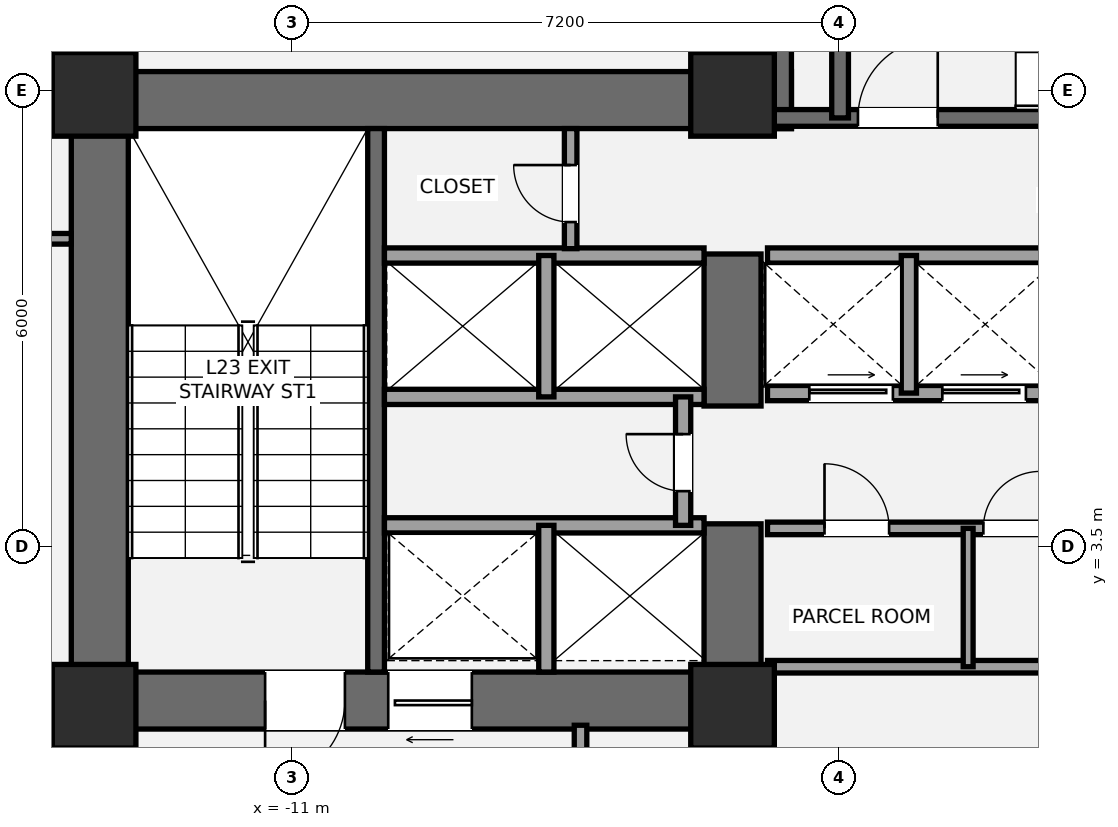
"""IFC4 building model, lengths in metres.
Left out: names, types, materials, properties, quantities, classifications, styles, units other than length and angle.
Written with IfcOpenShell. Run it as: python <this file> out.ifc"""

import sys

from ifc_helpers import new_model, si_unit, direction, frame, frame_2d, origin, origin_2d, place, context, subcontext, project, spatial, rectangle, extrude, element, fill, save


model = new_model("IFC4")
c1 = context("Model", 3, precision=1e-05, world=origin(), true_north=direction((0.0, 1.0)))
c2 = subcontext(c1, "Body", "Model", "MODEL_VIEW")
j1 = project(units=[si_unit("LENGTHUNIT", "METRE"), si_unit("PLANEANGLEUNIT", "RADIAN")], contexts=[c1])
p1 = place(None, origin())
s1 = spatial("IfcSite", under=j1, at=p1, CompositionType="ELEMENT")
p2 = place(p1, origin())
s2 = spatial("IfcBuilding", under=s1, at=p2, CompositionType="ELEMENT")
p3 = place(p2, frame((0.0, 0.0, 89.6)))
s3 = spatial("IfcBuildingStorey", under=s2, at=p3, CompositionType="ELEMENT", Elevation=89.6)
p4 = place(p3, frame((-13.525, 1.1, 0.0), z_axis=(0.0, 0.0, 1.0), x_axis=(0.0, 1.0, 0.0)))
e1 = element("IfcWall", 1, at=p4, inside=s3, PredefinedType="SHEAR", context=c2, shape_type="SweptSolid", body=[
    extrude(rectangle(XDim=8.65, YDim=0.75, at=frame_2d((4.325, 0.0))), origin(), (0.0, 0.0, 1.0), 3.5),
])
p5 = place(p3, frame((-13.9, 9.375, 0.0), z_axis=(0.0, 0.0, 1.0), x_axis=(1.0, 0.0, 0.0)))
e2 = element("IfcWall", 2, at=p5, inside=s3, PredefinedType="SHEAR", context=c2, shape_type="SweptSolid", body=[
    extrude(rectangle(XDim=9.475, YDim=0.75, at=frame_2d((4.737, 0.0))), origin(), (0.0, 0.0, 1.0), 3.5),
])
p6 = place(p3, frame((-4.825, 1.475, 0.0), z_axis=(0.0, 0.0, 1.0), x_axis=(-1.0, 0.0, 0.0)))
e3 = element("IfcWall", 3, at=p6, inside=s3, PredefinedType="SHEAR", context=c2, shape_type="SweptSolid", body=[
    extrude(rectangle(XDim=9.075, YDim=0.75, at=frame_2d((4.538, 0.0))), origin(), (0.0, 0.0, 1.0), 3.5),
])
p7 = place(p6, frame((5.475, 0.0, 0.0)))
e4 = element("IfcOpeningElement", 4, at=p7, cuts=e3, PredefinedType="OPENING", context=c2, shape_type="SweptSolid", body=[
    extrude(rectangle(XDim=1.05, YDim=2.15, at=frame_2d((0.525, 1.075))), frame((0.0, 0.385, 0.0), z_axis=(0.0, -1.0, 0.0), x_axis=(1.0, 0.0, 0.0)), (0.0, 0.0, 1.0), 0.77),
])
p8 = place(p6, frame((3.805, 0.0, 0.0)))
e5 = element("IfcOpeningElement", 5, at=p8, cuts=e3, PredefinedType="OPENING", context=c2, shape_type="SweptSolid", body=[
    extrude(rectangle(XDim=1.1, YDim=2.2, at=frame_2d((0.55, 1.1))), frame((0.0, 0.385, 0.0), z_axis=(0.0, -1.0, 0.0), x_axis=(1.0, 0.0, 0.0)), (0.0, 0.0, 1.0), 0.77),
])
p9 = place(p3, frame((-5.2, 1.1, 0.0), z_axis=(0.0, 0.0, 1.0), x_axis=(0.0, 1.0, 0.0)))
e6 = element("IfcWall", 6, at=p9, inside=s3, PredefinedType="SHEAR", context=c2, shape_type="SweptSolid", body=[
    extrude(rectangle(XDim=2.7, YDim=0.75, at=frame_2d((1.35, 0.0))), origin(), (0.0, 0.0, 1.0), 3.5),
])
p10 = place(p3, frame((-5.2, 5.35, 0.0), z_axis=(0.0, 0.0, 1.0), x_axis=(0.0, 1.0, 0.0)))
e7 = element("IfcWall", 7, at=p10, inside=s3, PredefinedType="SHEAR", context=c2, shape_type="SweptSolid", body=[
    extrude(rectangle(XDim=2.0, YDim=0.75, at=frame_2d((1.0, 0.0))), origin(), (0.0, 0.0, 1.0), 3.5),
])
p11 = place(p3, frame((-9.89, 1.85, 0.0), z_axis=(0.0, 0.0, 1.0), x_axis=(0.0, 1.0, 0.0)))
e8 = element("IfcWall", 8, at=p11, inside=s3, PredefinedType="SHEAR", context=c2, shape_type="SweptSolid", body=[
    extrude(rectangle(XDim=7.15, YDim=0.22, at=frame_2d((3.575, 0.0))), origin(), (0.0, 0.0, 1.0), 3.5),
])
p12 = place(p3, frame((-4.8, 9.0, 0.0), z_axis=(0.0, 0.0, 1.0), x_axis=(0.0, 1.0, 0.0)))
e9 = element("IfcWall", 9, at=p12, inside=s3, PredefinedType="SHEAR", context=c2, shape_type="SweptSolid", body=[
    extrude(rectangle(XDim=4.15, YDim=0.75, at=frame_2d((2.075, 0.0))), origin(), (0.0, 0.0, 1.0), 3.5),
])
p13 = place(p3, frame((-4.7, 9.14, 0.0), z_axis=(0.0, 0.0, 1.0), x_axis=(1.0, 0.0, 0.0)))
e10 = element("IfcWall", 10, at=p13, inside=s3, PredefinedType="SHEAR", context=c2, shape_type="SweptSolid", body=[
    extrude(rectangle(XDim=9.3, YDim=0.22, at=frame_2d((4.65, 0.0))), origin(), (0.0, 0.0, 1.0), 3.5),
])
p14 = place(p13, frame((1.15, 0.0, 0.0)))
e11 = element("IfcOpeningElement", 11, at=p14, cuts=e10, PredefinedType="OPENING", context=c2, shape_type="SweptSolid", body=[
    extrude(rectangle(XDim=1.05, YDim=2.15, at=frame_2d((0.525, 1.075))), frame((0.0, 0.12, 0.0), z_axis=(0.0, -1.0, 0.0), x_axis=(1.0, 0.0, 0.0)), (0.0, 0.0, 1.0), 0.24),
])
p15 = place(p3, frame((-3.785, 9.14, 0.0), z_axis=(0.0, 0.0, 1.0), x_axis=(0.0, 1.0, 0.0)))
e12 = element("IfcWall", 12, at=p15, inside=s3, PredefinedType="SHEAR", context=c2, shape_type="SweptSolid", body=[
    extrude(rectangle(XDim=3.26, YDim=0.22, at=frame_2d((1.63, 0.0))), origin(), (0.0, 0.0, 1.0), 3.5),
])
for number, where, z_axis, x_axis in (
    (13, (-13.6, 1.4, 0.0), (0.0, 0.0, 1.0), (1.0, 0.0, 0.0)),
    (14, (-13.6, 9.45, 0.0), (0.0, 0.0, 1.0), (1.0, 0.0, 0.0)),
    (15, (-5.2, 1.4, 0.0), (0.0, 0.0, 1.0), (1.0, 0.0, 0.0)),
    (16, (-5.2, 9.45, 0.0), (0.0, 0.0, 1.0), (1.0, 0.0, 0.0)),
):
    element("IfcColumn", number, at=place(p3, frame(where, z_axis=z_axis, x_axis=x_axis)), inside=s3, PredefinedType="COLUMN", context=c2, shape_type="SweptSolid", body=[
        extrude(rectangle(XDim=1.1, YDim=1.1, at=origin_2d()), origin(), (0.0, 0.0, 1.0), 3.5),
    ])
p16 = place(p3, frame((-13.45, -2.15, 0.0), z_axis=(0.0, 0.0, 1.0), x_axis=(0.0, 1.0, 0.0)))
e17 = element("IfcWall", 17, at=p16, inside=s3, PredefinedType="PARTITIONING", context=c2, shape_type="SweptSolid", body=[
    extrude(rectangle(XDim=3.3, YDim=0.165, at=frame_2d((1.65, 0.0))), origin(), (0.0, 0.0, 1.0), 2.763),
])
p17 = place(p16, frame((1.15, 0.0, 0.0)))
e18 = element("IfcOpeningElement", 18, at=p17, cuts=e17, PredefinedType="OPENING", context=c2, shape_type="SweptSolid", body=[
    extrude(rectangle(XDim=1.05, YDim=2.15, at=frame_2d((0.525, 1.075))), frame((0.0, 0.093, 0.0), z_axis=(0.0, -1.0, 0.0), x_axis=(1.0, 0.0, 0.0)), (0.0, 0.0, 1.0), 0.185),
])
p18 = place(p3, frame((-7.2, -2.15, 0.0), z_axis=(0.0, 0.0, 1.0), x_axis=(0.0, 1.0, 0.0)))
e19 = element("IfcWall", 19, at=p18, inside=s3, PredefinedType="PARTITIONING", context=c2, shape_type="SweptSolid", body=[
    extrude(rectangle(XDim=3.3, YDim=0.165, at=frame_2d((1.65, 0.0))), origin(), (0.0, 0.0, 1.0), 2.763),
])
p19 = place(p3, frame((-4.95, -2.15, 0.0), z_axis=(0.0, 0.0, 1.0), x_axis=(0.0, 1.0, 0.0)))
e20 = element("IfcWall", 20, at=p19, inside=s3, PredefinedType="SOLIDWALL", context=c2, shape_type="SweptSolid", body=[
    extrude(rectangle(XDim=3.3, YDim=0.2, at=frame_2d((1.65, 0.0))), origin(), (0.0, 0.0, 1.0), 2.763),
])
p20 = place(p19, frame((0.95, 0.0, 0.0)))
e21 = element("IfcOpeningElement", 21, at=p20, cuts=e20, PredefinedType="OPENING", context=c2, shape_type="SweptSolid", body=[
    extrude(rectangle(XDim=0.75, YDim=2.1, at=frame_2d((0.375, 1.05))), frame((0.0, 0.11, 0.0), z_axis=(0.0, -1.0, 0.0), x_axis=(1.0, 0.0, 0.0)), (0.0, 0.0, 1.0), 0.22),
])
p21 = place(p3, frame((-9.78, 3.78, 0.0), z_axis=(0.0, 0.0, 1.0), x_axis=(1.0, 0.0, 0.0)))
e22 = element("IfcWall", 22, at=p21, inside=s3, PredefinedType="SOLIDWALL", context=c2, shape_type="SweptSolid", body=[
    extrude(rectangle(XDim=4.205, YDim=0.2, at=frame_2d((2.103, 0.0))), origin(), (0.0, 0.0, 1.0), 3.31),
])
p22 = place(p3, frame((-7.65, 1.85, 0.0), z_axis=(0.0, 0.0, 1.0), x_axis=(0.0, 1.0, 0.0)))
e23 = element("IfcWall", 23, at=p22, inside=s3, PredefinedType="SOLIDWALL", context=c2, shape_type="SweptSolid", body=[
    extrude(rectangle(XDim=1.93, YDim=0.2, at=frame_2d((0.965, 0.0))), origin(), (0.0, 0.0, 1.0), 3.31),
])
for number, where, z_axis, x_axis in (
    (24, (-9.78, 5.47, 0.0), (0.0, 0.0, 1.0), (1.0, 0.0, 0.0)),
    (25, (-9.78, 7.33, 0.0), (0.0, 0.0, 1.0), (1.0, 0.0, 0.0)),
):
    element("IfcWall", number, at=place(p3, frame(where, z_axis=z_axis, x_axis=x_axis)), inside=s3, PredefinedType="SOLIDWALL", context=c2, shape_type="SweptSolid", body=[
        extrude(rectangle(XDim=4.205, YDim=0.2, at=frame_2d((2.103, 0.0))), origin(), (0.0, 0.0, 1.0), 3.31),
    ])
p23 = place(p3, frame((-7.65, 5.47, 0.0), z_axis=(0.0, 0.0, 1.0), x_axis=(0.0, 1.0, 0.0)))
e26 = element("IfcWall", 26, at=p23, inside=s3, PredefinedType="SOLIDWALL", context=c2, shape_type="SweptSolid", body=[
    extrude(rectangle(XDim=1.86, YDim=0.2, at=frame_2d((0.93, 0.0))), origin(), (0.0, 0.0, 1.0), 3.31),
])
p24 = place(p3, frame((-5.85, 3.78, 0.0), z_axis=(0.0, 0.0, 1.0), x_axis=(0.0, 1.0, 0.0)))
e27 = element("IfcWall", 27, at=p24, inside=s3, PredefinedType="SOLIDWALL", context=c2, shape_type="SweptSolid", body=[
    extrude(rectangle(XDim=1.69, YDim=0.2, at=frame_2d((0.845, 0.0))), origin(), (0.0, 0.0, 1.0), 3.31),
])
p25 = place(p24, frame((0.45, 0.0, 0.0)))
e28 = element("IfcOpeningElement", 28, at=p25, cuts=e27, PredefinedType="OPENING", context=c2, shape_type="SweptSolid", body=[
    extrude(rectangle(XDim=0.75, YDim=2.1, at=frame_2d((0.375, 1.05))), frame((0.0, 0.11, 0.0), z_axis=(0.0, -1.0, 0.0), x_axis=(1.0, 0.0, 0.0)), (0.0, 0.0, 1.0), 0.22),
])
p26 = place(p3, frame((-4.74, 1.92, 0.0), z_axis=(0.0, 0.0, 1.0), x_axis=(1.0, 0.0, 0.0)))
e29 = element("IfcWall", 29, at=p26, inside=s3, PredefinedType="PARTITIONING", context=c2, shape_type="SweptSolid", body=[
    extrude(rectangle(XDim=3.89, YDim=0.165, at=frame_2d((1.945, 0.0))), origin(), (0.0, 0.0, 1.0), 2.3),
])
p27 = place(p3, frame((-4.74, 3.74, 0.0), z_axis=(0.0, 0.0, 1.0), x_axis=(1.0, 0.0, 0.0)))
e30 = element("IfcWall", 30, at=p27, inside=s3, PredefinedType="PARTITIONING", context=c2, shape_type="SweptSolid", body=[
    extrude(rectangle(XDim=3.89, YDim=0.165, at=frame_2d((1.945, 0.0))), origin(), (0.0, 0.0, 1.0), 3.31),
])
p28 = place(p27, frame((0.75, 0.0, 0.0)))
e31 = element("IfcOpeningElement", 31, at=p28, cuts=e30, PredefinedType="OPENING", context=c2, shape_type="SweptSolid", body=[
    extrude(rectangle(XDim=0.85, YDim=2.1, at=frame_2d((0.425, 1.05))), frame((0.0, 0.093, 0.0), z_axis=(0.0, -1.0, 0.0), x_axis=(1.0, 0.0, 0.0)), (0.0, 0.0, 1.0), 0.185),
])
p29 = place(p27, frame((2.84, 0.0, 0.0)))
e32 = element("IfcOpeningElement", 32, at=p29, cuts=e30, PredefinedType="OPENING", context=c2, shape_type="SweptSolid", body=[
    extrude(rectangle(XDim=0.75, YDim=2.1, at=frame_2d((0.375, 1.05))), frame((0.0, 0.093, 0.0), z_axis=(0.0, -1.0, 0.0), x_axis=(1.0, 0.0, 0.0)), (0.0, 0.0, 1.0), 0.185),
])
p30 = place(p3, frame((-2.1, 1.92, 0.0), z_axis=(0.0, 0.0, 1.0), x_axis=(0.0, 1.0, 0.0)))
e33 = element("IfcWall", 33, at=p30, inside=s3, PredefinedType="PARTITIONING", context=c2, shape_type="SweptSolid", body=[
    extrude(rectangle(XDim=1.82, YDim=0.13, at=frame_2d((0.91, 0.0))), origin(), (0.0, 0.0, 1.0), 3.31),
])
p31 = place(p3, frame((-4.74, 5.52, 0.0), z_axis=(0.0, 0.0, 1.0), x_axis=(1.0, 0.0, 0.0)))
e34 = element("IfcWall", 34, at=p31, inside=s3, PredefinedType="SOLIDWALL", context=c2, shape_type="SweptSolid", body=[
    extrude(rectangle(XDim=3.86, YDim=0.2, at=frame_2d((1.93, 0.0))), origin(), (0.0, 0.0, 1.0), 3.31),
])
p32 = place(p31, frame((0.55, 0.0, 0.0)))
e35 = element("IfcOpeningElement", 35, at=p32, cuts=e34, PredefinedType="OPENING", context=c2, shape_type="SweptSolid", body=[
    extrude(rectangle(XDim=1.1, YDim=2.2, at=frame_2d((0.55, 1.1))), frame((0.0, 0.11, 0.0), z_axis=(0.0, -1.0, 0.0), x_axis=(1.0, 0.0, 0.0)), (0.0, 0.0, 1.0), 0.22),
])
p33 = place(p31, frame((2.3, 0.0, 0.0)))
e36 = element("IfcOpeningElement", 36, at=p33, cuts=e34, PredefinedType="OPENING", context=c2, shape_type="SweptSolid", body=[
    extrude(rectangle(XDim=1.1, YDim=2.2, at=frame_2d((0.55, 1.1))), frame((0.0, 0.11, 0.0), z_axis=(0.0, -1.0, 0.0), x_axis=(1.0, 0.0, 0.0)), (0.0, 0.0, 1.0), 0.22),
])
p34 = place(p3, frame((-4.74, 7.33, 0.0), z_axis=(0.0, 0.0, 1.0), x_axis=(1.0, 0.0, 0.0)))
e37 = element("IfcWall", 37, at=p34, inside=s3, PredefinedType="SOLIDWALL", context=c2, shape_type="SweptSolid", body=[
    extrude(rectangle(XDim=3.86, YDim=0.2, at=frame_2d((1.93, 0.0))), origin(), (0.0, 0.0, 1.0), 3.31),
])
p35 = place(p3, frame((-2.88, 5.52, 0.0), z_axis=(0.0, 0.0, 1.0), x_axis=(0.0, 1.0, 0.0)))
e38 = element("IfcWall", 38, at=p35, inside=s3, PredefinedType="SOLIDWALL", context=c2, shape_type="SweptSolid", body=[
    extrude(rectangle(XDim=1.81, YDim=0.2, at=frame_2d((0.905, 0.0))), origin(), (0.0, 0.0, 1.0), 3.31),
])
p36 = place(p3, frame((-7.33, 7.42, 0.0), z_axis=(0.0, 0.0, 1.0), x_axis=(0.0, 1.0, 0.0)))
e39 = element("IfcWall", 39, at=p36, inside=s3, PredefinedType="PARTITIONING", context=c2, shape_type="SweptSolid", body=[
    extrude(rectangle(XDim=1.58, YDim=0.165, at=frame_2d((0.79, 0.0))), origin(), (0.0, 0.0, 1.0), 3.31),
])
p37 = place(p36, frame((0.35, 0.0, 0.0)))
e40 = element("IfcOpeningElement", 40, at=p37, cuts=e39, PredefinedType="OPENING", context=c2, shape_type="SweptSolid", body=[
    extrude(rectangle(XDim=0.75, YDim=2.1, at=frame_2d((0.375, 1.05))), frame((0.0, 0.093, 0.0), z_axis=(0.0, -1.0, 0.0), x_axis=(1.0, 0.0, 0.0)), (0.0, 0.0, 1.0), 0.185),
])
p38 = place(p3, frame((-16.2, 7.55, 0.0), z_axis=(0.0, 0.0, 1.0), x_axis=(1.0, 0.0, 0.0)))
e41 = element("IfcWall", 41, at=p38, inside=s3, PredefinedType="PARTITIONING", context=c2, shape_type="SweptSolid", body=[
    extrude(rectangle(XDim=2.3, YDim=0.14, at=frame_2d((1.15, 0.0))), origin(), (0.0, 0.0, 1.0), 2.763),
])
p39 = place(p38, frame((0.32, 0.0, 0.0)))
e42 = element("IfcOpeningElement", 42, at=p39, cuts=e41, PredefinedType="OPENING", context=c2, shape_type="SweptSolid", body=[
    extrude(rectangle(XDim=0.92, YDim=2.15, at=frame_2d((0.46, 1.075))), frame((0.0, 0.08, 0.0), z_axis=(0.0, -1.0, 0.0), x_axis=(1.0, 0.0, 0.0)), (0.0, 0.0, 1.0), 0.16),
])
p40 = place(p7, origin())
e43 = element("IfcDoor", 43, at=p40, inside=s3, OperationType="SINGLE_SWING_RIGHT", PredefinedType="DOOR", context=c2, shape_type="SweptSolid", body=[
    extrude(rectangle(XDim=1.05, YDim=2.15, at=frame_2d((0.525, 1.075))), frame((0.0, 0.025, 0.0), z_axis=(0.0, -1.0, 0.0), x_axis=(1.0, 0.0, 0.0)), (0.0, 0.0, 1.0), 0.05),
])
fill(e4, e43)
p41 = place(p14, origin())
e44 = element("IfcDoor", 44, at=p41, inside=s3, OperationType="SINGLE_SWING_RIGHT", PredefinedType="DOOR", context=c2, shape_type="SweptSolid", body=[
    extrude(rectangle(XDim=1.05, YDim=2.15, at=frame_2d((0.525, 1.075))), frame((0.0, 0.025, 0.0), z_axis=(0.0, -1.0, 0.0), x_axis=(1.0, 0.0, 0.0)), (0.0, 0.0, 1.0), 0.05),
])
fill(e11, e44)
p42 = place(p8, origin())
e45 = element("IfcDoor", 45, at=p42, inside=s3, OperationType="SLIDING_TO_LEFT", PredefinedType="DOOR", context=c2, shape_type="SweptSolid", body=[
    extrude(rectangle(XDim=1.1, YDim=2.2, at=frame_2d((0.55, 1.1))), frame((0.0, 0.025, 0.0), z_axis=(0.0, -1.0, 0.0), x_axis=(1.0, 0.0, 0.0)), (0.0, 0.0, 1.0), 0.05),
])
fill(e5, e45)
p43 = place(p25, origin())
e46 = element("IfcDoor", 46, at=p43, inside=s3, OperationType="SINGLE_SWING_RIGHT", PredefinedType="DOOR", context=c2, shape_type="SweptSolid", body=[
    extrude(rectangle(XDim=0.75, YDim=2.1, at=frame_2d((0.375, 1.05))), frame((0.0, 0.025, 0.0), z_axis=(0.0, -1.0, 0.0), x_axis=(1.0, 0.0, 0.0)), (0.0, 0.0, 1.0), 0.05),
])
fill(e28, e46)
p44 = place(p28, origin())
e47 = element("IfcDoor", 47, at=p44, inside=s3, OperationType="SINGLE_SWING_LEFT", PredefinedType="DOOR", context=c2, shape_type="SweptSolid", body=[
    extrude(rectangle(XDim=0.85, YDim=2.1, at=frame_2d((0.425, 1.05))), frame((0.0, 0.025, 0.0), z_axis=(0.0, -1.0, 0.0), x_axis=(1.0, 0.0, 0.0)), (0.0, 0.0, 1.0), 0.05),
])
fill(e31, e47)
p45 = place(p29, origin())
e48 = element("IfcDoor", 48, at=p45, inside=s3, OperationType="SINGLE_SWING_RIGHT", PredefinedType="DOOR", context=c2, shape_type="SweptSolid", body=[
    extrude(rectangle(XDim=0.75, YDim=2.1, at=frame_2d((0.375, 1.05))), frame((0.0, 0.025, 0.0), z_axis=(0.0, -1.0, 0.0), x_axis=(1.0, 0.0, 0.0)), (0.0, 0.0, 1.0), 0.05),
])
fill(e32, e48)
p46 = place(p32, origin())
e49 = element("IfcDoor", 49, at=p46, inside=s3, OperationType="SLIDING_TO_LEFT", PredefinedType="DOOR", context=c2, shape_type="SweptSolid", body=[
    extrude(rectangle(XDim=1.1, YDim=2.2, at=frame_2d((0.55, 1.1))), frame((0.0, 0.025, 0.0), z_axis=(0.0, -1.0, 0.0), x_axis=(1.0, 0.0, 0.0)), (0.0, 0.0, 1.0), 0.05),
])
fill(e35, e49)
p47 = place(p33, origin())
e50 = element("IfcDoor", 50, at=p47, inside=s3, OperationType="SLIDING_TO_LEFT", PredefinedType="DOOR", context=c2, shape_type="SweptSolid", body=[
    extrude(rectangle(XDim=1.1, YDim=2.2, at=frame_2d((0.55, 1.1))), frame((0.0, 0.025, 0.0), z_axis=(0.0, -1.0, 0.0), x_axis=(1.0, 0.0, 0.0)), (0.0, 0.0, 1.0), 0.05),
])
fill(e36, e50)
p48 = place(p37, origin())
e51 = element("IfcDoor", 51, at=p48, inside=s3, OperationType="SINGLE_SWING_RIGHT", PredefinedType="DOOR", context=c2, shape_type="SweptSolid", body=[
    extrude(rectangle(XDim=0.75, YDim=2.1, at=frame_2d((0.375, 1.05))), frame((0.0, 0.025, 0.0), z_axis=(0.0, -1.0, 0.0), x_axis=(1.0, 0.0, 0.0)), (0.0, 0.0, 1.0), 0.05),
])
fill(e40, e51)
save(model, sys.argv[1])
